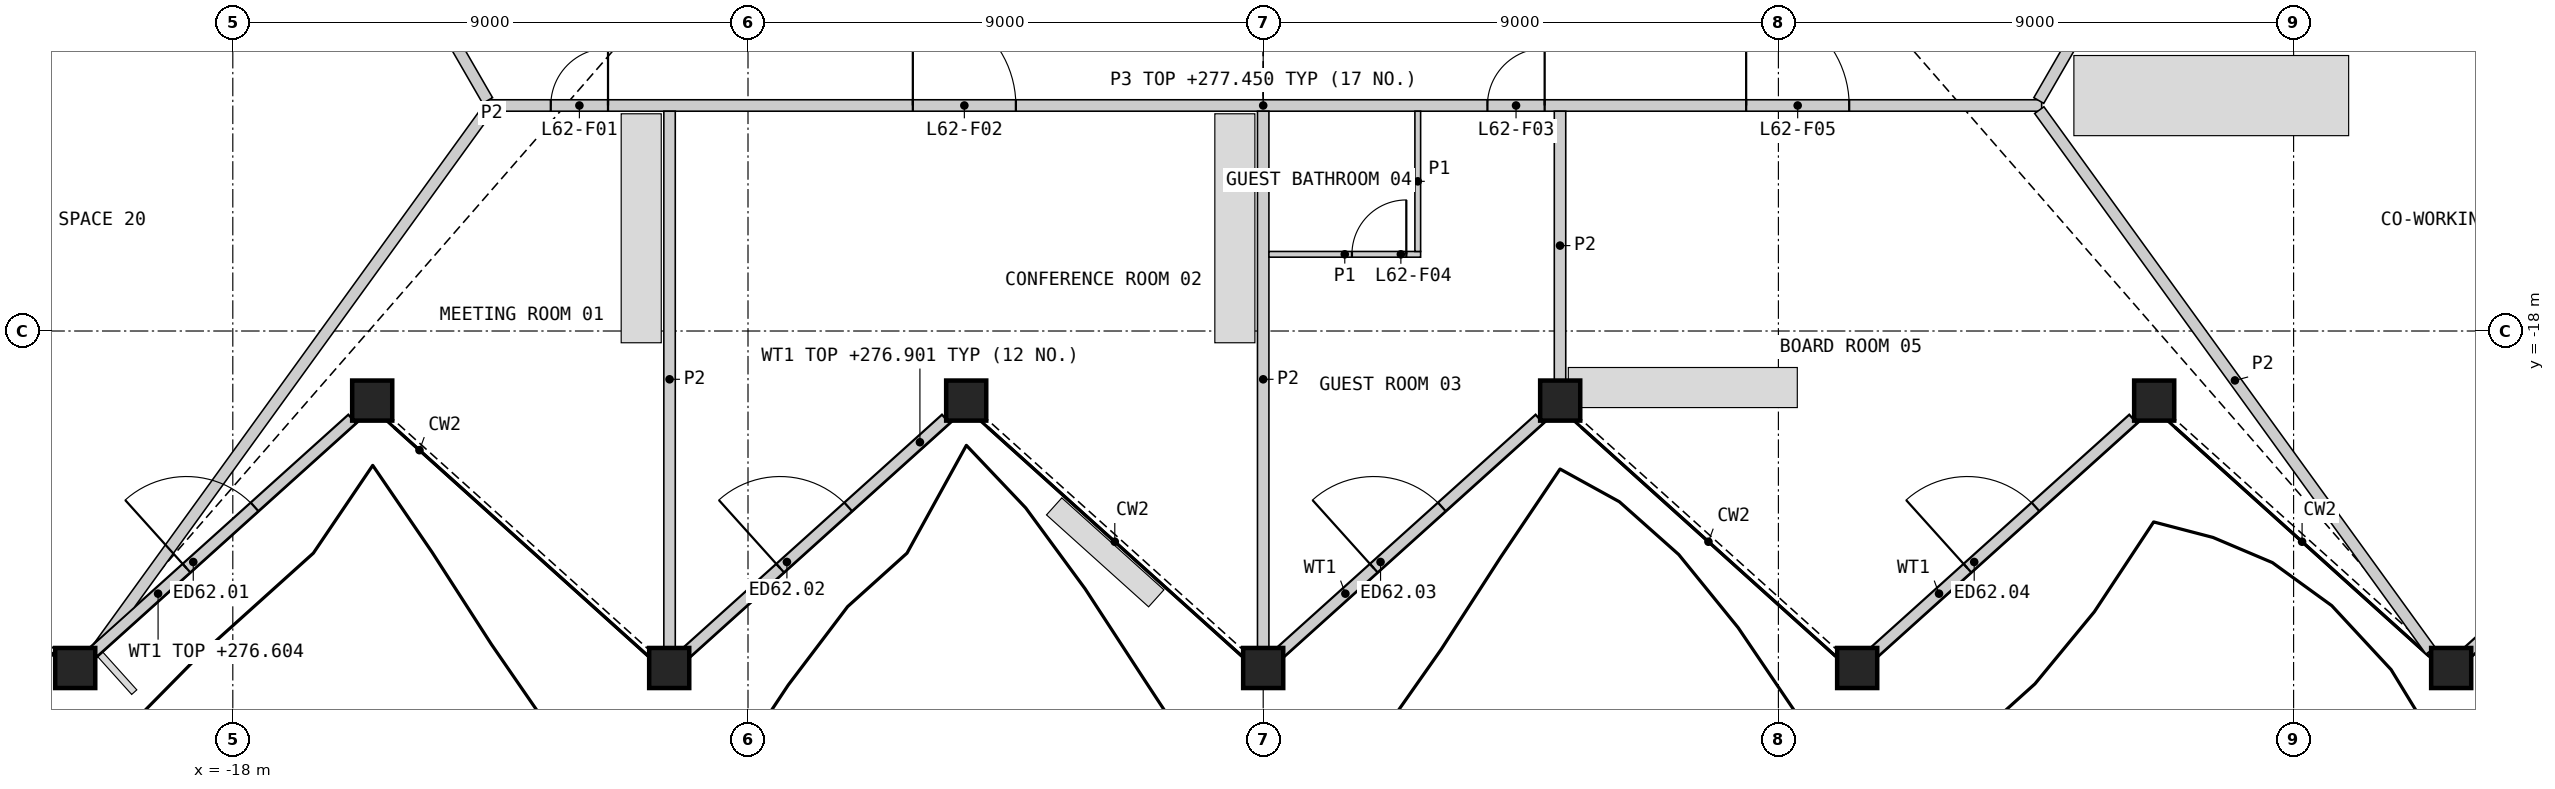
"""IFC4 building model, lengths in metres.
Left out: names, types, materials, properties, quantities, classifications, styles, units other than length and angle.
Written with IfcOpenShell. Run it as: python <this file> out.ifc"""

import sys

from ifc_helpers import new_model, si_unit, direction, frame, frame_2d, origin, origin_2d, place, context, subcontext, project, spatial, polyline, rectangle, hollow_rectangle, outline, extrude, element, fill, save


model = new_model("IFC4")
c1 = context("Model", 3, precision=1e-05, world=origin(), true_north=direction((0.0, 1.0)))
c2 = subcontext(c1, "Body", "Model", "MODEL_VIEW")
j1 = project(units=[si_unit("LENGTHUNIT", "METRE"), si_unit("PLANEANGLEUNIT", "RADIAN")], contexts=[c1])
p1 = place(None, origin())
s1 = spatial("IfcSite", under=j1, at=p1, CompositionType="ELEMENT")
p2 = place(p1, origin())
s2 = spatial("IfcBuilding", under=s1, at=p2, CompositionType="ELEMENT")
p3 = place(p2, frame((0.0, 0.0, 274.2)))
s3 = spatial("IfcBuildingStorey", under=s2, at=p3, CompositionType="ELEMENT", Elevation=274.2)
for number, where, z_axis, x_axis in (
    (1, (-20.753, -23.887, 0.0), (0.0, 0.0, 1.0), (1.0, 0.0, 0.0)),
    (2, (-15.565, -19.215, 0.0), (0.0, 0.0, 1.0), (1.0, 0.0, 0.0)),
    (3, (-10.376, -23.887, 0.0), (0.0, 0.0, 1.0), (1.0, 0.0, 0.0)),
    (4, (-5.188, -19.215, 0.0), (0.0, 0.0, 1.0), (1.0, 0.0, 0.0)),
    (5, (0.0, -23.887, 0.0), (0.0, 0.0, 1.0), (1.0, 0.0, 0.0)),
    (6, (5.188, -19.215, 0.0), (0.0, 0.0, 1.0), (1.0, 0.0, 0.0)),
    (7, (10.376, -23.887, 0.0), (0.0, 0.0, 1.0), (1.0, 0.0, 0.0)),
    (8, (15.565, -19.215, 0.0), (0.0, 0.0, 1.0), (1.0, 0.0, 0.0)),
    (9, (20.753, -23.887, 0.0), (0.0, 0.0, 1.0), (1.0, 0.0, 0.0)),
):
    element("IfcColumn", number, at=place(p3, frame(where, z_axis=z_axis, x_axis=x_axis)), inside=s3, PredefinedType="COLUMN", context=c2, shape_type="SweptSolid", body=[
        extrude(hollow_rectangle(XDim=0.7, YDim=0.7, WallThickness=0.045, at=origin_2d()), origin(), (0.0, 0.0, 1.0), 3.6),
    ])
p4 = place(p3, frame((-20.436, -23.606, 0.0), z_axis=(0.0, 0.0, 1.0), x_axis=(0.743162414049, 0.669111071755, 0.0)))
e10 = element("IfcWall", 10, at=p4, inside=s3, PredefinedType="SOLIDWALL", context=c2, shape_type="SweptSolid", body=[
    extrude(rectangle(XDim=6.083, YDim=0.2, at=frame_2d((3.042, 0.0))), origin(), (0.0, 0.0, 1.0), 2.404),
])
p5 = place(p4, frame((2.188, 0.0, 0.0)))
e11 = element("IfcOpeningElement", 11, at=p5, cuts=e10, PredefinedType="OPENING", context=c2, shape_type="SweptSolid", body=[
    extrude(rectangle(XDim=1.6, YDim=2.4, at=frame_2d((0.8, 1.2))), frame((0.0, 0.11, 0.0), z_axis=(0.0, -1.0, 0.0), x_axis=(1.0, 0.0, 0.0)), (0.0, 0.0, 1.0), 0.22),
])
p6 = place(p3, frame((-10.065, -23.606, 0.0), z_axis=(0.0, 0.0, 1.0), x_axis=(0.743144443869, 0.669131030178, 0.0)))
e12 = element("IfcWall", 12, at=p6, inside=s3, PredefinedType="SOLIDWALL", context=c2, shape_type="SweptSolid", body=[
    extrude(rectangle(XDim=6.083, YDim=0.2, at=frame_2d((3.041, 0.0))), origin(), (0.0, 0.0, 1.0), 2.701),
])
p7 = place(p6, frame((2.188, 0.0, 0.0)))
e13 = element("IfcOpeningElement", 13, at=p7, cuts=e12, PredefinedType="OPENING", context=c2, shape_type="SweptSolid", body=[
    extrude(rectangle(XDim=1.6, YDim=2.4, at=frame_2d((0.8, 1.2))), frame((0.0, 0.11, 0.0), z_axis=(0.0, -1.0, 0.0), x_axis=(1.0, 0.0, 0.0)), (0.0, 0.0, 1.0), 0.22),
])
p8 = place(p3, frame((0.305, -23.606, 0.0), z_axis=(0.0, 0.0, 1.0), x_axis=(0.743144443869, 0.669131030178, 0.0)))
e14 = element("IfcWall", 14, at=p8, inside=s3, PredefinedType="SOLIDWALL", context=c2, shape_type="SweptSolid", body=[
    extrude(rectangle(XDim=6.083, YDim=0.2, at=frame_2d((3.041, 0.0))), origin(), (0.0, 0.0, 1.0), 2.701),
])
p9 = place(p8, frame((2.188, 0.0, 0.0)))
e15 = element("IfcOpeningElement", 15, at=p9, cuts=e14, PredefinedType="OPENING", context=c2, shape_type="SweptSolid", body=[
    extrude(rectangle(XDim=1.6, YDim=2.4, at=frame_2d((0.8, 1.2))), frame((0.0, 0.11, 0.0), z_axis=(0.0, -1.0, 0.0), x_axis=(1.0, 0.0, 0.0)), (0.0, 0.0, 1.0), 0.22),
])
p10 = place(p3, frame((10.676, -23.606, 0.0), z_axis=(0.0, 0.0, 1.0), x_axis=(0.743144443869, 0.669131030178, 0.0)))
e16 = element("IfcWall", 16, at=p10, inside=s3, PredefinedType="SOLIDWALL", context=c2, shape_type="SweptSolid", body=[
    extrude(rectangle(XDim=6.083, YDim=0.2, at=frame_2d((3.041, 0.0))), origin(), (0.0, 0.0, 1.0), 2.701),
])
p11 = place(p10, frame((2.188, 0.0, 0.0)))
e17 = element("IfcOpeningElement", 17, at=p11, cuts=e16, PredefinedType="OPENING", context=c2, shape_type="SweptSolid", body=[
    extrude(rectangle(XDim=1.6, YDim=2.4, at=frame_2d((0.8, 1.2))), frame((0.0, 0.11, 0.0), z_axis=(0.0, -1.0, 0.0), x_axis=(1.0, 0.0, 0.0)), (0.0, 0.0, 1.0), 0.22),
])
p12 = place(p3, frame((21.046, -23.606, 0.0), z_axis=(0.0, 0.0, 1.0), x_axis=(0.743162414049, 0.669111071755, 0.0)))
e18 = element("IfcWall", 18, at=p12, inside=s3, PredefinedType="SOLIDWALL", context=c2, shape_type="SweptSolid", body=[
    extrude(rectangle(XDim=6.083, YDim=0.2, at=frame_2d((3.042, 0.0))), origin(), (0.0, 0.0, 1.0), 2.701),
])
p13 = place(p12, frame((2.188, 0.0, 0.0)))
e19 = element("IfcOpeningElement", 19, at=p13, cuts=e18, PredefinedType="OPENING", context=c2, shape_type="SweptSolid", body=[
    extrude(rectangle(XDim=1.6, YDim=2.4, at=frame_2d((0.8, 1.2))), frame((0.0, 0.11, 0.0), z_axis=(0.0, -1.0, 0.0), x_axis=(1.0, 0.0, 0.0)), (0.0, 0.0, 1.0), 0.22),
])
p14 = place(p3, frame((-13.599, -14.06, 0.0), z_axis=(0.0, 0.0, 1.0), x_axis=(1.0, 0.0, 0.0)))
e20 = element("IfcWall", 20, at=p14, inside=s3, PredefinedType="PARTITIONING", context=c2, shape_type="SweptSolid", body=[
    extrude(rectangle(XDim=27.198, YDim=0.2, at=frame_2d((13.599, 0.0))), origin(), (0.0, 0.0, 1.0), 3.25),
])
p15 = place(p14, frame((1.153, 0.0, 0.0)))
e21 = element("IfcOpeningElement", 21, at=p15, cuts=e20, PredefinedType="OPENING", context=c2, shape_type="SweptSolid", body=[
    extrude(rectangle(XDim=1.0, YDim=2.1, at=frame_2d((0.5, 1.05))), frame((0.0, 0.11, 0.0), z_axis=(0.0, -1.0, 0.0), x_axis=(1.0, 0.0, 0.0)), (0.0, 0.0, 1.0), 0.22),
])
p16 = place(p14, frame((7.478, 0.0, 0.0)))
e22 = element("IfcOpeningElement", 22, at=p16, cuts=e20, PredefinedType="OPENING", context=c2, shape_type="SweptSolid", body=[
    extrude(rectangle(XDim=1.8, YDim=2.1, at=frame_2d((0.9, 1.05))), frame((0.0, 0.11, 0.0), z_axis=(0.0, -1.0, 0.0), x_axis=(1.0, 0.0, 0.0)), (0.0, 0.0, 1.0), 0.22),
])
p17 = place(p14, frame((17.516, 0.0, 0.0)))
e23 = element("IfcOpeningElement", 23, at=p17, cuts=e20, PredefinedType="OPENING", context=c2, shape_type="SweptSolid", body=[
    extrude(rectangle(XDim=1.0, YDim=2.1, at=frame_2d((0.5, 1.05))), frame((0.0, 0.11, 0.0), z_axis=(0.0, -1.0, 0.0), x_axis=(1.0, 0.0, 0.0)), (0.0, 0.0, 1.0), 0.22),
])
p18 = place(p14, frame((22.036, 0.0, 0.0)))
e24 = element("IfcOpeningElement", 24, at=p18, cuts=e20, PredefinedType="OPENING", context=c2, shape_type="SweptSolid", body=[
    extrude(rectangle(XDim=1.8, YDim=2.1, at=frame_2d((0.9, 1.05))), frame((0.0, 0.11, 0.0), z_axis=(0.0, -1.0, 0.0), x_axis=(1.0, 0.0, 0.0)), (0.0, 0.0, 1.0), 0.22),
])
for number, where, z_axis, x_axis in (
    (25, (13.549, -13.974, 0.0), (0.0, 0.0, 1.0), (0.5, 0.866, 0.0)),
    (26, (-15.05, -11.374, 0.0), (0.0, 0.0, 1.0), (0.5, -0.866, 0.0)),
):
    element("IfcWall", number, at=place(p3, frame(where, z_axis=z_axis, x_axis=x_axis)), inside=s3, PredefinedType="PARTITIONING", context=c2, shape_type="SweptSolid", body=[
        extrude(rectangle(XDim=3.002, YDim=0.2, at=frame_2d((1.501, 0.0))), origin(), (0.0, 0.0, 1.0), 3.25),
    ])
p19 = place(p3, frame((13.557, -14.141, 0.0), z_axis=(0.0, 0.0, 1.0), x_axis=(0.586363418846, -0.810048110324, 0.0)))
e27 = element("IfcWall", 27, at=p19, inside=s3, PredefinedType="PARTITIONING", context=c2, shape_type="SweptSolid", body=[
    extrude(rectangle(XDim=11.658, YDim=0.2, at=frame_2d((5.829, 0.0))), origin(), (0.0, 0.0, 1.0), 2.404),
])
p20 = place(p3, origin())
e28 = element("IfcWall", 28, at=p20, inside=s3, PredefinedType="PARTITIONING", context=c2, shape_type="SweptSolid", body=[
    extrude(outline(polyline([(-13.476, -14.2), (-19.723, -22.83), (-20.432, -23.468), (-13.638, -14.083), (-13.476, -14.2)])), origin(), (0.0, 0.0, 1.0), 2.404),
])
for number, where, z_axis, x_axis in (
    (29, (-10.37, -23.527, 0.0), (0.0, 0.0, 1.0), (0.0, 1.0, 0.0)),
    (30, (0.0, -23.527, 0.0), (0.0, 0.0, 1.0), (0.0, 1.0, 0.0)),
):
    element("IfcWall", number, at=place(p3, frame(where, z_axis=z_axis, x_axis=x_axis)), inside=s3, PredefinedType="PARTITIONING", context=c2, shape_type="SweptSolid", body=[
        extrude(rectangle(XDim=9.366, YDim=0.2, at=frame_2d((4.683, 0.0))), origin(), (0.0, 0.0, 1.0), 2.404),
    ])
p21 = place(p3, frame((5.185, -18.855, 0.0), z_axis=(0.0, 0.0, 1.0), x_axis=(0.0, 1.0, 0.0)))
e31 = element("IfcWall", 31, at=p21, inside=s3, PredefinedType="PARTITIONING", context=c2, shape_type="SweptSolid", body=[
    extrude(rectangle(XDim=4.695, YDim=0.2, at=frame_2d((2.348, 0.0))), origin(), (0.0, 0.0, 1.0), 2.404),
])
p22 = place(p3, frame((0.1, -16.66, 0.0), z_axis=(0.0, 0.0, 1.0), x_axis=(1.0, 0.0, 0.0)))
e32 = element("IfcWall", 32, at=p22, inside=s3, PredefinedType="PARTITIONING", context=c2, shape_type="SweptSolid", body=[
    extrude(rectangle(XDim=2.65, YDim=0.1, at=frame_2d((1.325, 0.0))), origin(), (0.0, 0.0, 1.0), 2.404),
])
p23 = place(p22, frame((1.45, 0.0, 0.0)))
e33 = element("IfcOpeningElement", 33, at=p23, cuts=e32, PredefinedType="OPENING", context=c2, shape_type="SweptSolid", body=[
    extrude(rectangle(XDim=0.95, YDim=2.1, at=frame_2d((0.475, 1.05))), frame((0.0, 0.06, 0.0), z_axis=(0.0, -1.0, 0.0), x_axis=(1.0, 0.0, 0.0)), (0.0, 0.0, 1.0), 0.12),
])
p24 = place(p3, frame((2.7, -16.61, 0.0), z_axis=(0.0, 0.0, 1.0), x_axis=(0.0, 1.0, 0.0)))
e34 = element("IfcWall", 34, at=p24, inside=s3, PredefinedType="PARTITIONING", context=c2, shape_type="SweptSolid", body=[
    extrude(rectangle(XDim=2.45, YDim=0.1, at=frame_2d((1.225, 0.0))), origin(), (0.0, 0.0, 1.0), 2.404),
])
p25 = place(p5, origin())
e35 = element("IfcDoor", 35, at=p25, inside=s3, OperationType="DOUBLE_DOOR_SINGLE_SWING", PredefinedType="DOOR", context=c2, shape_type="SweptSolid", body=[
    extrude(rectangle(XDim=1.6, YDim=2.4, at=frame_2d((0.8, 1.2))), frame((0.0, 0.025, 0.0), z_axis=(0.0, -1.0, 0.0), x_axis=(1.0, 0.0, 0.0)), (0.0, 0.0, 1.0), 0.05),
])
fill(e11, e35)
p26 = place(p7, origin())
e36 = element("IfcDoor", 36, at=p26, inside=s3, OperationType="DOUBLE_DOOR_SINGLE_SWING", PredefinedType="DOOR", context=c2, shape_type="SweptSolid", body=[
    extrude(rectangle(XDim=1.6, YDim=2.4, at=frame_2d((0.8, 1.2))), frame((0.0, 0.025, 0.0), z_axis=(0.0, -1.0, 0.0), x_axis=(1.0, 0.0, 0.0)), (0.0, 0.0, 1.0), 0.05),
])
fill(e13, e36)
p27 = place(p9, origin())
e37 = element("IfcDoor", 37, at=p27, inside=s3, OperationType="DOUBLE_DOOR_SINGLE_SWING", PredefinedType="DOOR", context=c2, shape_type="SweptSolid", body=[
    extrude(rectangle(XDim=1.6, YDim=2.4, at=frame_2d((0.8, 1.2))), frame((0.0, 0.025, 0.0), z_axis=(0.0, -1.0, 0.0), x_axis=(1.0, 0.0, 0.0)), (0.0, 0.0, 1.0), 0.05),
])
fill(e15, e37)
p28 = place(p11, origin())
e38 = element("IfcDoor", 38, at=p28, inside=s3, OperationType="DOUBLE_DOOR_SINGLE_SWING", PredefinedType="DOOR", context=c2, shape_type="SweptSolid", body=[
    extrude(rectangle(XDim=1.6, YDim=2.4, at=frame_2d((0.8, 1.2))), frame((0.0, 0.025, 0.0), z_axis=(0.0, -1.0, 0.0), x_axis=(1.0, 0.0, 0.0)), (0.0, 0.0, 1.0), 0.05),
])
fill(e17, e38)
p29 = place(p15, origin())
e39 = element("IfcDoor", 39, at=p29, inside=s3, OperationType="SINGLE_SWING_RIGHT", PredefinedType="DOOR", context=c2, shape_type="SweptSolid", body=[
    extrude(rectangle(XDim=1.0, YDim=2.1, at=frame_2d((0.5, 1.05))), frame((0.0, 0.025, 0.0), z_axis=(0.0, -1.0, 0.0), x_axis=(1.0, 0.0, 0.0)), (0.0, 0.0, 1.0), 0.05),
])
fill(e21, e39)
p30 = place(p16, origin())
e40 = element("IfcDoor", 40, at=p30, inside=s3, OperationType="DOUBLE_DOOR_SINGLE_SWING", PredefinedType="DOOR", context=c2, shape_type="SweptSolid", body=[
    extrude(rectangle(XDim=1.8, YDim=2.1, at=frame_2d((0.9, 1.05))), frame((0.0, 0.025, 0.0), z_axis=(0.0, -1.0, 0.0), x_axis=(1.0, 0.0, 0.0)), (0.0, 0.0, 1.0), 0.05),
])
fill(e22, e40)
p31 = place(p17, origin())
e41 = element("IfcDoor", 41, at=p31, inside=s3, OperationType="SINGLE_SWING_RIGHT", PredefinedType="DOOR", context=c2, shape_type="SweptSolid", body=[
    extrude(rectangle(XDim=1.0, YDim=2.1, at=frame_2d((0.5, 1.05))), frame((0.0, 0.025, 0.0), z_axis=(0.0, -1.0, 0.0), x_axis=(1.0, 0.0, 0.0)), (0.0, 0.0, 1.0), 0.05),
])
fill(e23, e41)
p32 = place(p23, origin())
e42 = element("IfcDoor", 42, at=p32, inside=s3, OperationType="SINGLE_SWING_RIGHT", PredefinedType="DOOR", context=c2, shape_type="SweptSolid", body=[
    extrude(rectangle(XDim=0.95, YDim=2.1, at=frame_2d((0.475, 1.05))), frame((0.0, 0.025, 0.0), z_axis=(0.0, -1.0, 0.0), x_axis=(1.0, 0.0, 0.0)), (0.0, 0.0, 1.0), 0.05),
])
fill(e33, e42)
p33 = place(p18, origin())
e43 = element("IfcDoor", 43, at=p33, inside=s3, OperationType="DOUBLE_DOOR_SINGLE_SWING", PredefinedType="DOOR", context=c2, shape_type="SweptSolid", body=[
    extrude(rectangle(XDim=1.8, YDim=2.1, at=frame_2d((0.9, 1.05))), frame((0.0, 0.025, 0.0), z_axis=(0.0, -1.0, 0.0), x_axis=(1.0, 0.0, 0.0)), (0.0, 0.0, 1.0), 0.05),
])
fill(e24, e43)
save(model, sys.argv[1])
